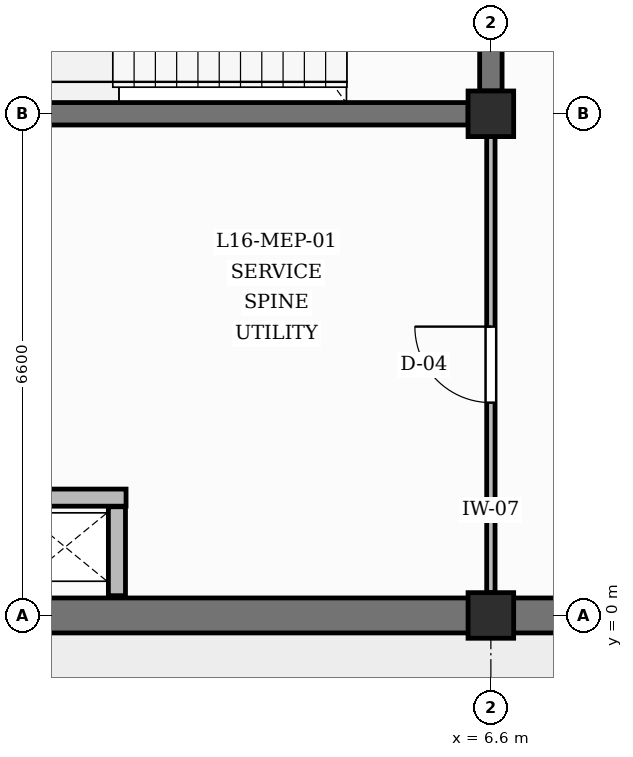
"""IFC4 building model, lengths in metres.
Left out: names, types, materials, properties, quantities, classifications, styles, units other than length and angle.
Written with IfcOpenShell. Run it as: python <this file> out.ifc"""

import sys

from ifc_helpers import new_model, si_unit, direction, frame, frame_2d, origin, origin_2d, place, context, subcontext, project, spatial, rectangle, extrude, element, fill, save


model = new_model("IFC4")
c1 = context("Model", 3, precision=1e-05, world=origin(), true_north=direction((0.0, 1.0)))
c2 = subcontext(c1, "Body", "Model", "MODEL_VIEW")
j1 = project(units=[si_unit("LENGTHUNIT", "METRE"), si_unit("PLANEANGLEUNIT", "RADIAN")], contexts=[c1])
p1 = place(None, origin())
s1 = spatial("IfcSite", under=j1, at=p1, CompositionType="ELEMENT")
p2 = place(p1, origin())
s2 = spatial("IfcBuilding", under=s1, at=p2, CompositionType="ELEMENT")
p3 = place(p2, frame((0.0, 0.0, 69.0)))
s3 = spatial("IfcBuildingStorey", under=s2, at=p3, CompositionType="ELEMENT", Elevation=69.0)
for number, where, z_axis, x_axis in (
    (1, (6.6, 0.0, 0.0), (0.0, 0.0, 1.0), (1.0, 0.0, 0.0)),
    (2, (6.6, 6.6, 0.0), (0.0, 0.0, 1.0), (1.0, 0.0, 0.0)),
):
    element("IfcColumn", number, at=place(p3, frame(where, z_axis=z_axis, x_axis=x_axis)), inside=s3, PredefinedType="COLUMN", context=c2, shape_type="SweptSolid", body=[
        extrude(rectangle(XDim=0.6, YDim=0.6, at=origin_2d()), origin(), (0.0, 0.0, 1.0), 4.2),
    ])
for number, where, z_axis, x_axis in (
    (3, (0.3, 0.0, 0.0), (0.0, 0.0, 1.0), (1.0, 0.0, 0.0)),
    (4, (6.9, 0.0, 0.0), (0.0, 0.0, 1.0), (1.0, 0.0, 0.0)),
):
    element("IfcWall", number, at=place(p3, frame(where, z_axis=z_axis, x_axis=x_axis)), inside=s3, PredefinedType="SOLIDWALL", context=c2, shape_type="SweptSolid", body=[
        extrude(rectangle(XDim=6.0, YDim=0.46, at=frame_2d((3.0, 0.0))), origin(), (0.0, 0.0, 1.0), 3.32),
    ])
p4 = place(p3, frame((0.3, 6.6, 0.0), z_axis=(0.0, 0.0, 1.0), x_axis=(1.0, 0.0, 0.0)))
e5 = element("IfcWall", 5, at=p4, inside=s3, PredefinedType="SHEAR", context=c2, shape_type="SweptSolid", body=[
    extrude(rectangle(XDim=6.0, YDim=0.295, at=frame_2d((3.0, 0.0))), origin(), (0.0, 0.0, 1.0), 3.56),
])
p5 = place(p3, frame((6.6, 6.9, 0.0), z_axis=(0.0, 0.0, 1.0), x_axis=(0.0, 1.0, 0.0)))
e6 = element("IfcWall", 6, at=p5, inside=s3, PredefinedType="SHEAR", context=c2, shape_type="SweptSolid", body=[
    extrude(rectangle(XDim=6.0, YDim=0.295, at=frame_2d((3.0, 0.0))), origin(), (0.0, 0.0, 1.0), 3.62),
])
p6 = place(p5, frame((2.425, 0.0, 0.0)))
e7 = element("IfcOpeningElement", 7, at=p6, cuts=e6, PredefinedType="OPENING", context=c2, shape_type="SweptSolid", body=[
    extrude(rectangle(XDim=1.15, YDim=2.2, at=frame_2d((0.575, 1.1))), frame((0.0, 0.157, 0.0), z_axis=(0.0, -1.0, 0.0), x_axis=(1.0, 0.0, 0.0)), (0.0, 0.0, 1.0), 0.315),
])
p7 = place(p3, frame((1.68, 0.26, 0.0), z_axis=(0.0, 0.0, 1.0), x_axis=(0.0, 1.0, 0.0)))
e8 = element("IfcWall", 8, at=p7, inside=s3, PredefinedType="PARTITIONING", context=c2, shape_type="SweptSolid", body=[
    extrude(rectangle(XDim=1.17, YDim=0.225, at=frame_2d((0.585, 0.0))), origin(), (0.0, 0.0, 1.0), 3.92),
])
p8 = place(p3, frame((0.26, 1.55, 0.0), z_axis=(0.0, 0.0, 1.0), x_axis=(1.0, 0.0, 0.0)))
e9 = element("IfcWall", 9, at=p8, inside=s3, PredefinedType="PARTITIONING", context=c2, shape_type="SweptSolid", body=[
    extrude(rectangle(XDim=1.54, YDim=0.225, at=frame_2d((0.77, 0.0))), origin(), (0.0, 0.0, 1.0), 3.92),
])
p9 = place(p3, frame((6.6, 0.3, 0.0), z_axis=(0.0, 0.0, 1.0), x_axis=(0.0, 1.0, 0.0)))
e10 = element("IfcWall", 10, at=p9, inside=s3, PredefinedType="PARTITIONING", context=c2, shape_type="SweptSolid", body=[
    extrude(rectangle(XDim=6.0, YDim=0.11, at=frame_2d((3.0, 0.0))), origin(), (0.0, 0.0, 1.0), 3.62),
])
p10 = place(p9, frame((2.5, 0.0, 0.0)))
e11 = element("IfcOpeningElement", 11, at=p10, cuts=e10, PredefinedType="OPENING", context=c2, shape_type="SweptSolid", body=[
    extrude(rectangle(XDim=1.0, YDim=2.1, at=frame_2d((0.5, 1.05))), frame((0.0, 0.065, 0.0), z_axis=(0.0, -1.0, 0.0), x_axis=(1.0, 0.0, 0.0)), (0.0, 0.0, 1.0), 0.13),
])
p11 = place(p10, origin())
e12 = element("IfcDoor", 12, at=p11, inside=s3, OperationType="SINGLE_SWING_RIGHT", PredefinedType="DOOR", context=c2, shape_type="SweptSolid", body=[
    extrude(rectangle(XDim=1.0, YDim=2.1, at=frame_2d((0.5, 1.05))), frame((0.0, 0.025, 0.0), z_axis=(0.0, -1.0, 0.0), x_axis=(1.0, 0.0, 0.0)), (0.0, 0.0, 1.0), 0.05),
])
fill(e11, e12)
save(model, sys.argv[1])
